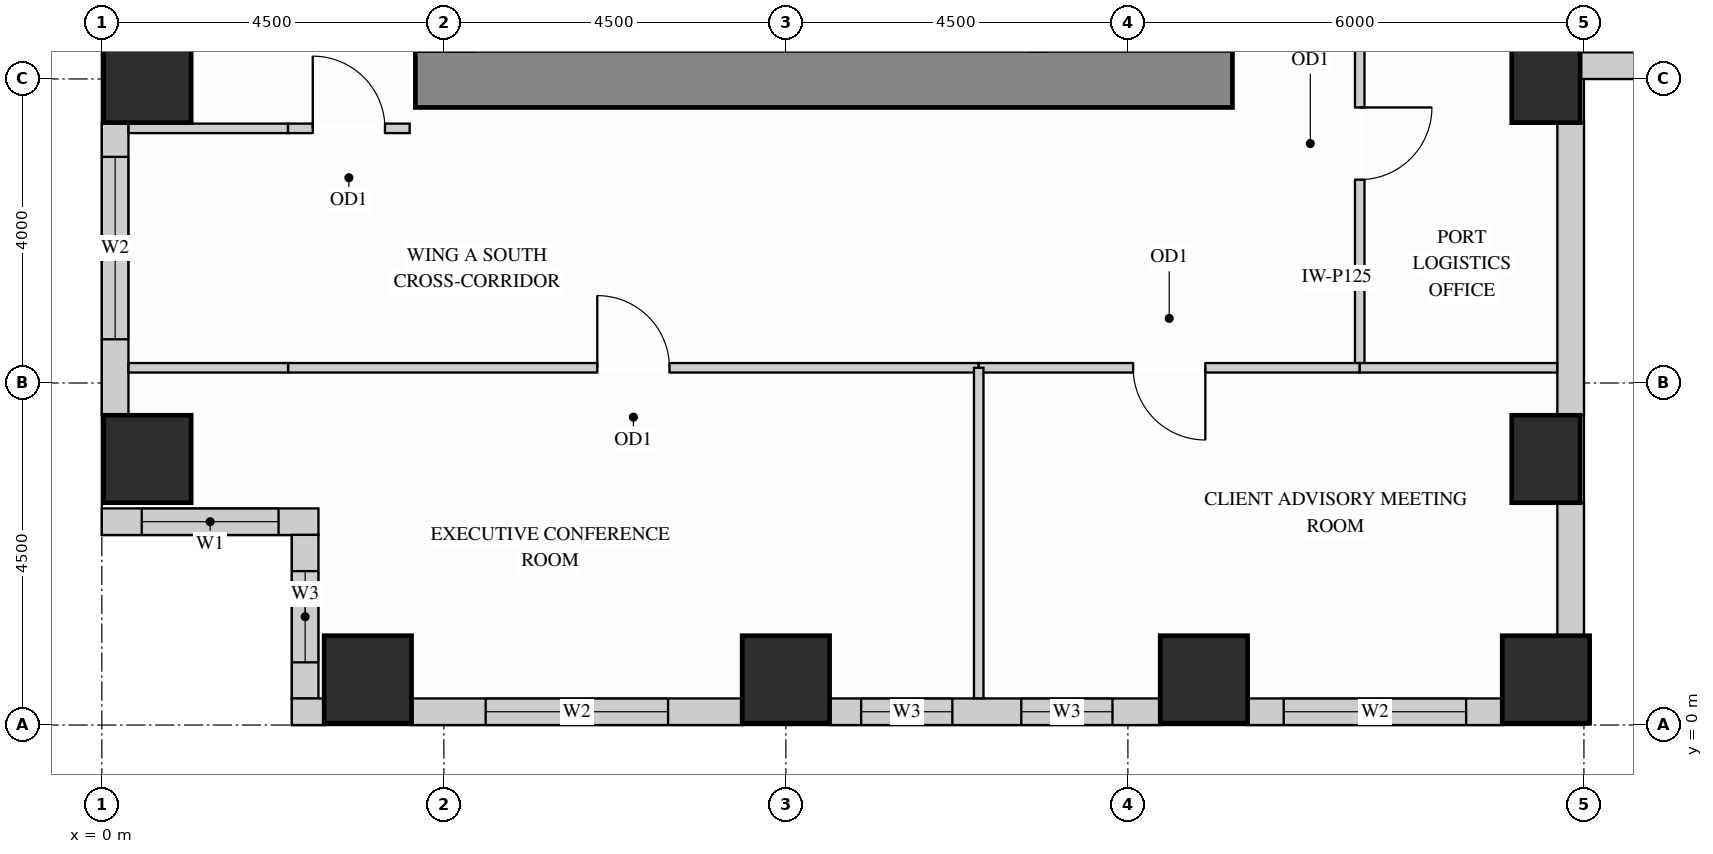
"""IFC4 building model, lengths in metres.
Left out: names, types, materials, properties, quantities, classifications, styles, units other than length and angle.
Written with IfcOpenShell. Run it as: python <this file> out.ifc"""

import sys

from ifc_helpers import new_model, si_unit, direction, frame, frame_2d, origin, origin_2d, place, context, subcontext, project, spatial, rectangle, extrude, source, transform, mapped, element, fill, save


model = new_model("IFC4")
c1 = context("Model", 3, precision=1e-05, world=origin(), true_north=direction((0.0, 1.0)))
c2 = subcontext(c1, "Body", "Model", "MODEL_VIEW")
j1 = project(units=[si_unit("LENGTHUNIT", "METRE"), si_unit("PLANEANGLEUNIT", "RADIAN")], contexts=[c1])
p1 = place(None, origin())
s1 = spatial("IfcSite", under=j1, at=p1, CompositionType="ELEMENT")
p2 = place(p1, origin())
s2 = spatial("IfcBuilding", under=s1, at=p2, CompositionType="ELEMENT")
p3 = place(p2, frame((0.0, 0.0, 99.0)))
s3 = spatial("IfcBuildingStorey", under=s2, at=p3, CompositionType="ELEMENT", Elevation=99.0)
m1 = source(origin(), c2, "Body", "SweptSolid", [
    extrude(rectangle(XDim=0.9, YDim=1.15, at=origin_2d()), origin(), (0.0, 0.0, 1.0), 3.38),
])
for number, where, z_axis, x_axis in (
    (1, (19.0, 3.5, 0.0), (0.0, 0.0, 1.0), (1.0, 0.0, 0.0)),
    (2, (19.0, 8.5, 0.0), (0.0, 0.0, 1.0), (1.0, 0.0, 0.0)),
):
    element("IfcColumn", number, at=place(p3, frame(where, z_axis=z_axis, x_axis=x_axis)), inside=s3, PredefinedType="COLUMN", context=c2, shape_type="MappedRepresentation", body=[
        mapped(m1, transform((0.0, 0.0, 0.0), x_axis=(1.0, 0.0, 0.0), y_axis=(0.0, 1.0, 0.0), z_axis=(0.0, 0.0, 1.0))),
    ])
m2 = source(origin(), c2, "Body", "SweptSolid", [
    extrude(rectangle(XDim=1.15, YDim=1.15, at=origin_2d()), origin(), (0.0, 0.0, 1.0), 3.38),
])
for number, where, z_axis, x_axis in (
    (3, (14.5, 0.6, 0.0), (0.0, 0.0, 1.0), (1.0, 0.0, 0.0)),
    (4, (19.0, 0.6, 0.0), (0.0, 0.0, 1.0), (1.0, 0.0, 0.0)),
    (5, (3.5, 0.6, 0.0), (0.0, 0.0, 1.0), (1.0, 0.0, 0.0)),
    (6, (9.0, 0.6, 0.0), (0.0, 0.0, 1.0), (1.0, 0.0, 0.0)),
    (7, (0.6, 3.5, 0.0), (0.0, 0.0, 1.0), (1.0, 0.0, 0.0)),
    (8, (0.6, 8.5, 0.0), (0.0, 0.0, 1.0), (1.0, 0.0, 0.0)),
):
    element("IfcColumn", number, at=place(p3, frame(where, z_axis=z_axis, x_axis=x_axis)), inside=s3, PredefinedType="COLUMN", context=c2, shape_type="MappedRepresentation", body=[
        mapped(m2, transform((0.0, 0.0, 0.0), x_axis=(1.0, 0.0, 0.0), y_axis=(0.0, 1.0, 0.0), z_axis=(0.0, 0.0, 1.0))),
    ])
m3 = source(origin(), c2, "Body", "SweptSolid", [
    extrude(rectangle(XDim=10.75, YDim=0.75, at=frame_2d((5.375, 0.0))), origin(), (0.0, 0.0, 1.0), 3.38),
])
p4 = place(p3, frame((4.125, 8.5, 0.0), z_axis=(0.0, 0.0, 1.0), x_axis=(1.0, 0.0, 0.0)))
e9 = element("IfcWall", 9, at=p4, inside=s3, PredefinedType="SHEAR", context=c2, shape_type="MappedRepresentation", body=[
    mapped(m3, transform((0.0, 0.0, 0.0), x_axis=(1.0, 0.0, 0.0), y_axis=(0.0, 1.0, 0.0), z_axis=(0.0, 0.0, 1.0))),
])
p5 = place(p3, frame((0.175, 7.927, 0.0), z_axis=(0.0, 0.0, 1.0), x_axis=(0.0, -1.0, 0.0)))
e10 = element("IfcWall", 10, at=p5, inside=s3, PredefinedType="SOLIDWALL", context=c2, shape_type="SweptSolid", body=[
    extrude(rectangle(XDim=3.854, YDim=0.35, at=frame_2d((1.927, 0.0))), origin(), (0.0, 0.0, 1.0), 3.365),
])
p6 = place(p5, frame((0.452, 0.0, 0.78)))
e11 = element("IfcOpeningElement", 11, at=p6, cuts=e10, PredefinedType="OPENING", context=c2, shape_type="SweptSolid", body=[
    extrude(rectangle(XDim=2.4, YDim=2.1, at=frame_2d((1.2, 1.05))), frame((0.0, 0.185, 0.0), z_axis=(0.0, -1.0, 0.0), x_axis=(1.0, 0.0, 0.0)), (0.0, 0.0, 1.0), 0.37),
])
p7 = place(p3, frame((0.0, 2.675, 0.0), z_axis=(0.0, 0.0, 1.0), x_axis=(1.0, 0.0, 0.0)))
e12 = element("IfcWall", 12, at=p7, inside=s3, PredefinedType="SOLIDWALL", context=c2, shape_type="SweptSolid", body=[
    extrude(rectangle(XDim=2.85, YDim=0.35, at=frame_2d((1.425, 0.0))), origin(), (0.0, 0.0, 1.0), 3.365),
])
p8 = place(p7, frame((0.525, 0.0, 0.78)))
e13 = element("IfcOpeningElement", 13, at=p8, cuts=e12, PredefinedType="OPENING", context=c2, shape_type="SweptSolid", body=[
    extrude(rectangle(XDim=1.8, YDim=2.1, at=frame_2d((0.9, 1.05))), frame((0.0, 0.185, 0.0), z_axis=(0.0, -1.0, 0.0), x_axis=(1.0, 0.0, 0.0)), (0.0, 0.0, 1.0), 0.37),
])
p9 = place(p3, frame((2.675, 2.502, 0.0), z_axis=(0.0, 0.0, 1.0), x_axis=(0.0, -1.0, 0.0)))
e14 = element("IfcWall", 14, at=p9, inside=s3, PredefinedType="SOLIDWALL", context=c2, shape_type="SweptSolid", body=[
    extrude(rectangle(XDim=2.154, YDim=0.35, at=frame_2d((1.077, 0.0))), origin(), (0.0, 0.0, 1.0), 3.365),
])
p10 = place(p9, frame((0.477, 0.0, 0.78)))
e15 = element("IfcOpeningElement", 15, at=p10, cuts=e14, PredefinedType="OPENING", context=c2, shape_type="SweptSolid", body=[
    extrude(rectangle(XDim=1.2, YDim=2.1, at=frame_2d((0.6, 1.05))), frame((0.0, 0.185, 0.0), z_axis=(0.0, -1.0, 0.0), x_axis=(1.0, 0.0, 0.0)), (0.0, 0.0, 1.0), 0.37),
])
m4 = source(origin(), c2, "Body", "SweptSolid", [
    extrude(rectangle(XDim=0.427, YDim=0.35, at=frame_2d((0.213, 0.0))), origin(), (0.0, 0.0, 1.0), 3.365),
])
p11 = place(p3, frame((2.5, 0.175, 0.0), z_axis=(0.0, 0.0, 1.0), x_axis=(1.0, 0.0, 0.0)))
e16 = element("IfcWall", 16, at=p11, inside=s3, PredefinedType="SOLIDWALL", context=c2, shape_type="MappedRepresentation", body=[
    mapped(m4, transform((0.0, 0.0, 0.0), x_axis=(1.0, 0.0, 0.0), y_axis=(0.0, 1.0, 0.0), z_axis=(0.0, 0.0, 1.0))),
])
p12 = place(p3, frame((4.073, 0.175, 0.0), z_axis=(0.0, 0.0, 1.0), x_axis=(1.0, 0.0, 0.0)))
e17 = element("IfcWall", 17, at=p12, inside=s3, PredefinedType="SOLIDWALL", context=c2, shape_type="SweptSolid", body=[
    extrude(rectangle(XDim=4.354, YDim=0.35, at=frame_2d((2.177, 0.0))), origin(), (0.0, 0.0, 1.0), 3.365),
])
p13 = place(p12, frame((0.977, 0.0, 0.78)))
e18 = element("IfcOpeningElement", 18, at=p13, cuts=e17, PredefinedType="OPENING", context=c2, shape_type="SweptSolid", body=[
    extrude(rectangle(XDim=2.4, YDim=2.1, at=frame_2d((1.2, 1.05))), frame((0.0, 0.185, 0.0), z_axis=(0.0, -1.0, 0.0), x_axis=(1.0, 0.0, 0.0)), (0.0, 0.0, 1.0), 0.37),
])
p14 = place(p3, frame((9.573, 0.175, 0.0), z_axis=(0.0, 0.0, 1.0), x_axis=(1.0, 0.0, 0.0)))
e19 = element("IfcWall", 19, at=p14, inside=s3, PredefinedType="SOLIDWALL", context=c2, shape_type="SweptSolid", body=[
    extrude(rectangle(XDim=4.354, YDim=0.35, at=frame_2d((2.177, 0.0))), origin(), (0.0, 0.0, 1.0), 3.365),
])
p15 = place(p14, frame((0.417, 0.0, 0.78)))
e20 = element("IfcOpeningElement", 20, at=p15, cuts=e19, PredefinedType="OPENING", context=c2, shape_type="SweptSolid", body=[
    extrude(rectangle(XDim=1.2, YDim=2.1, at=frame_2d((0.6, 1.05))), frame((0.0, 0.185, 0.0), z_axis=(0.0, -1.0, 0.0), x_axis=(1.0, 0.0, 0.0)), (0.0, 0.0, 1.0), 0.37),
])
p16 = place(p14, frame((2.524, 0.0, 0.78)))
e21 = element("IfcOpeningElement", 21, at=p16, cuts=e19, PredefinedType="OPENING", context=c2, shape_type="SweptSolid", body=[
    extrude(rectangle(XDim=1.2, YDim=2.1, at=frame_2d((0.6, 1.05))), frame((0.0, 0.185, 0.0), z_axis=(0.0, -1.0, 0.0), x_axis=(1.0, 0.0, 0.0)), (0.0, 0.0, 1.0), 0.37),
])
p17 = place(p3, frame((15.073, 0.175, 0.0), z_axis=(0.0, 0.0, 1.0), x_axis=(1.0, 0.0, 0.0)))
e22 = element("IfcWall", 22, at=p17, inside=s3, PredefinedType="SOLIDWALL", context=c2, shape_type="SweptSolid", body=[
    extrude(rectangle(XDim=3.354, YDim=0.35, at=frame_2d((1.677, 0.0))), origin(), (0.0, 0.0, 1.0), 3.365),
])
p18 = place(p17, frame((0.477, 0.0, 0.78)))
e23 = element("IfcOpeningElement", 23, at=p18, cuts=e22, PredefinedType="OPENING", context=c2, shape_type="SweptSolid", body=[
    extrude(rectangle(XDim=2.4, YDim=2.1, at=frame_2d((1.2, 1.05))), frame((0.0, 0.185, 0.0), z_axis=(0.0, -1.0, 0.0), x_axis=(1.0, 0.0, 0.0)), (0.0, 0.0, 1.0), 0.37),
])
m5 = source(origin(), c2, "Body", "SweptSolid", [
    extrude(rectangle(XDim=1.754, YDim=0.35, at=frame_2d((0.877, 0.0))), origin(), (0.0, 0.0, 1.0), 2.519),
])
p19 = place(p3, frame((19.325, 1.173, 0.0), z_axis=(0.0, 0.0, 1.0), x_axis=(0.0, 1.0, 0.0)))
e24 = element("IfcWall", 24, at=p19, inside=s3, PredefinedType="SOLIDWALL", context=c2, shape_type="MappedRepresentation", body=[
    mapped(m5, transform((0.0, 0.0, 0.0), x_axis=(1.0, 0.0, 0.0), y_axis=(0.0, 1.0, 0.0), z_axis=(0.0, 0.0, 1.0))),
])
m6 = source(origin(), c2, "Body", "SweptSolid", [
    extrude(rectangle(XDim=3.854, YDim=0.35, at=frame_2d((1.927, 0.0))), origin(), (0.0, 0.0, 1.0), 2.519),
])
p20 = place(p3, frame((19.325, 4.073, 0.0), z_axis=(0.0, 0.0, 1.0), x_axis=(0.0, 1.0, 0.0)))
e25 = element("IfcWall", 25, at=p20, inside=s3, PredefinedType="SOLIDWALL", context=c2, shape_type="MappedRepresentation", body=[
    mapped(m6, transform((0.0, 0.0, 0.0), x_axis=(1.0, 0.0, 0.0), y_axis=(0.0, 1.0, 0.0), z_axis=(0.0, 0.0, 1.0))),
])
p21 = place(p3, frame((19.448, 8.675, 0.0), z_axis=(0.0, 0.0, 1.0), x_axis=(1.0, 0.0, 0.0)))
e26 = element("IfcWall", 26, at=p21, inside=s3, PredefinedType="SOLIDWALL", context=c2, shape_type="SweptSolid", body=[
    extrude(rectangle(XDim=3.504, YDim=0.35, at=frame_2d((1.752, 0.0))), origin(), (0.0, 0.0, 1.0), 3.365),
])
p22 = place(p21, frame((1.002, 0.0, 0.78)))
e27 = element("IfcOpeningElement", 27, at=p22, cuts=e26, PredefinedType="OPENING", context=c2, shape_type="SweptSolid", body=[
    extrude(rectangle(XDim=1.5, YDim=2.0, at=frame_2d((0.75, 1.0))), frame((0.0, 0.185, 0.0), z_axis=(0.0, -1.0, 0.0), x_axis=(1.0, 0.0, 0.0)), (0.0, 0.0, 1.0), 0.37),
])
p23 = place(p3, frame((16.55, 4.7, 0.0), z_axis=(0.0, 0.0, 1.0), x_axis=(0.0, 1.0, 0.0)))
e28 = element("IfcWall", 28, at=p23, inside=s3, PredefinedType="PARTITIONING", context=c2, shape_type="SweptSolid", body=[
    extrude(rectangle(XDim=5.9, YDim=0.125, at=frame_2d((2.95, 0.0))), origin(), (0.0, 0.0, 1.0), 3.365),
])
p24 = place(p23, frame((2.475, 0.0, 0.0)))
e29 = element("IfcOpeningElement", 29, at=p24, cuts=e28, PredefinedType="OPENING", context=c2, shape_type="SweptSolid", body=[
    extrude(rectangle(XDim=0.95, YDim=2.15, at=frame_2d((0.475, 1.075))), frame((0.0, 0.073, 0.0), z_axis=(0.0, -1.0, 0.0), x_axis=(1.0, 0.0, 0.0)), (0.0, 0.0, 1.0), 0.145),
])
m7 = source(origin(), c2, "Body", "SweptSolid", [
    extrude(rectangle(XDim=2.098, YDim=0.125, at=frame_2d((1.049, 0.0))), origin(), (0.0, 0.0, 1.0), 3.365),
])
p25 = place(p3, frame((0.352, 7.85, 0.0), z_axis=(0.0, 0.0, 1.0), x_axis=(1.0, 0.0, 0.0)))
e30 = element("IfcWall", 30, at=p25, inside=s3, PredefinedType="PARTITIONING", context=c2, shape_type="MappedRepresentation", body=[
    mapped(m7, transform((0.0, 0.0, 0.0), x_axis=(1.0, 0.0, 0.0), y_axis=(0.0, 1.0, 0.0), z_axis=(0.0, 0.0, 1.0))),
])
p26 = place(p3, frame((2.45, 7.85, 0.0), z_axis=(0.0, 0.0, 1.0), x_axis=(1.0, 0.0, 0.0)))
e31 = element("IfcWall", 31, at=p26, inside=s3, PredefinedType="PARTITIONING", context=c2, shape_type="SweptSolid", body=[
    extrude(rectangle(XDim=1.6, YDim=0.125, at=frame_2d((0.8, 0.0))), origin(), (0.0, 0.0, 1.0), 3.365),
])
p27 = place(p26, frame((0.325, 0.0, 0.0)))
e32 = element("IfcOpeningElement", 32, at=p27, cuts=e31, PredefinedType="OPENING", context=c2, shape_type="SweptSolid", body=[
    extrude(rectangle(XDim=0.95, YDim=2.15, at=frame_2d((0.475, 1.075))), frame((0.0, 0.073, 0.0), z_axis=(0.0, -1.0, 0.0), x_axis=(1.0, 0.0, 0.0)), (0.0, 0.0, 1.0), 0.145),
])
p28 = place(p3, frame((2.45, 4.7, 0.0), z_axis=(0.0, 0.0, 1.0), x_axis=(1.0, 0.0, 0.0)))
e33 = element("IfcWall", 33, at=p28, inside=s3, PredefinedType="PARTITIONING", context=c2, shape_type="SweptSolid", body=[
    extrude(rectangle(XDim=9.087, YDim=0.125, at=frame_2d((4.543, 0.0))), origin(), (0.0, 0.0, 1.0), 2.828),
])
p29 = place(p28, frame((4.069, 0.0, 0.0)))
e34 = element("IfcOpeningElement", 34, at=p29, cuts=e33, PredefinedType="OPENING", context=c2, shape_type="SweptSolid", body=[
    extrude(rectangle(XDim=0.95, YDim=2.15, at=frame_2d((0.475, 1.075))), frame((0.0, 0.073, 0.0), z_axis=(0.0, -1.0, 0.0), x_axis=(1.0, 0.0, 0.0)), (0.0, 0.0, 1.0), 0.145),
])
p30 = place(p3, frame((11.537, 4.7, 0.0), z_axis=(0.0, 0.0, 1.0), x_axis=(1.0, 0.0, 0.0)))
e35 = element("IfcWall", 35, at=p30, inside=s3, PredefinedType="PARTITIONING", context=c2, shape_type="SweptSolid", body=[
    extrude(rectangle(XDim=5.013, YDim=0.125, at=frame_2d((2.506, 0.0))), origin(), (0.0, 0.0, 1.0), 2.828),
])
p31 = place(p30, frame((2.031, 0.0, 0.0)))
e36 = element("IfcOpeningElement", 36, at=p31, cuts=e35, PredefinedType="OPENING", context=c2, shape_type="SweptSolid", body=[
    extrude(rectangle(XDim=0.95, YDim=2.15, at=frame_2d((0.475, 1.075))), frame((0.0, 0.073, 0.0), z_axis=(0.0, -1.0, 0.0), x_axis=(1.0, 0.0, 0.0)), (0.0, 0.0, 1.0), 0.145),
])
m8 = source(origin(), c2, "Body", "SweptSolid", [
    extrude(rectangle(XDim=2.098, YDim=0.125, at=frame_2d((1.049, 0.0))), origin(), (0.0, 0.0, 1.0), 2.828),
])
p32 = place(p3, frame((0.352, 4.7, 0.0), z_axis=(0.0, 0.0, 1.0), x_axis=(1.0, 0.0, 0.0)))
e37 = element("IfcWall", 37, at=p32, inside=s3, PredefinedType="PARTITIONING", context=c2, shape_type="MappedRepresentation", body=[
    mapped(m8, transform((0.0, 0.0, 0.0), x_axis=(1.0, 0.0, 0.0), y_axis=(0.0, 1.0, 0.0), z_axis=(0.0, 0.0, 1.0))),
])
m9 = source(origin(), c2, "Body", "SweptSolid", [
    extrude(rectangle(XDim=2.598, YDim=0.125, at=frame_2d((1.299, 0.0))), origin(), (0.0, 0.0, 1.0), 2.828),
])
p33 = place(p3, frame((16.55, 4.7, 0.0), z_axis=(0.0, 0.0, 1.0), x_axis=(1.0, 0.0, 0.0)))
e38 = element("IfcWall", 38, at=p33, inside=s3, PredefinedType="PARTITIONING", context=c2, shape_type="MappedRepresentation", body=[
    mapped(m9, transform((0.0, 0.0, 0.0), x_axis=(1.0, 0.0, 0.0), y_axis=(0.0, 1.0, 0.0), z_axis=(0.0, 0.0, 1.0))),
])
m10 = source(origin(), c2, "Body", "SweptSolid", [
    extrude(rectangle(XDim=4.348, YDim=0.125, at=frame_2d((2.174, 0.0))), origin(), (0.0, 0.0, 1.0), 3.365),
])
p34 = place(p3, frame((11.537, 0.352, 0.0), z_axis=(0.0, 0.0, 1.0), x_axis=(0.0, 1.0, 0.0)))
e39 = element("IfcWall", 39, at=p34, inside=s3, PredefinedType="PARTITIONING", context=c2, shape_type="MappedRepresentation", body=[
    mapped(m10, transform((0.0, 0.0, 0.0), x_axis=(1.0, 0.0, 0.0), y_axis=(0.0, 1.0, 0.0), z_axis=(0.0, 0.0, 1.0))),
])
m11 = source(origin(), c2, "Body", "SweptSolid", [
    extrude(rectangle(XDim=0.95, YDim=2.15, at=frame_2d((0.475, 1.075))), frame((0.0, 0.025, 0.0), z_axis=(0.0, -1.0, 0.0), x_axis=(1.0, 0.0, 0.0)), (0.0, 0.0, 1.0), 0.05),
])
p35 = place(p24, origin())
e40 = element("IfcDoor", 40, at=p35, inside=s3, OperationType="SINGLE_SWING_RIGHT", PredefinedType="DOOR", context=c2, shape_type="MappedRepresentation", body=[
    mapped(m11, transform((0.0, 0.0, 0.0), x_axis=(1.0, 0.0, 0.0), y_axis=(0.0, 1.0, 0.0), z_axis=(0.0, 0.0, 1.0))),
])
fill(e29, e40)
p36 = place(p29, origin())
e41 = element("IfcDoor", 41, at=p36, inside=s3, OperationType="SINGLE_SWING_LEFT", PredefinedType="DOOR", context=c2, shape_type="MappedRepresentation", body=[
    mapped(m11, transform((0.0, 0.0, 0.0), x_axis=(1.0, 0.0, 0.0), y_axis=(0.0, 1.0, 0.0), z_axis=(0.0, 0.0, 1.0))),
])
fill(e34, e41)
p37 = place(p31, origin())
e42 = element("IfcDoor", 42, at=p37, inside=s3, OperationType="SINGLE_SWING_RIGHT", PredefinedType="DOOR", context=c2, shape_type="MappedRepresentation", body=[
    mapped(m11, transform((0.0, 0.0, 0.0), x_axis=(1.0, 0.0, 0.0), y_axis=(0.0, 1.0, 0.0), z_axis=(0.0, 0.0, 1.0))),
])
fill(e36, e42)
p38 = place(p27, origin())
e43 = element("IfcDoor", 43, at=p38, inside=s3, OperationType="SINGLE_SWING_LEFT", PredefinedType="DOOR", context=c2, shape_type="MappedRepresentation", body=[
    mapped(m11, transform((0.0, 0.0, 0.0), x_axis=(1.0, 0.0, 0.0), y_axis=(0.0, 1.0, 0.0), z_axis=(0.0, 0.0, 1.0))),
])
fill(e32, e43)
m12 = source(origin(), c2, "Body", "SweptSolid", [
    extrude(rectangle(XDim=1.8, YDim=2.1, at=frame_2d((0.9, 1.05))), frame((0.0, 0.03, 0.0), z_axis=(0.0, -1.0, 0.0), x_axis=(1.0, 0.0, 0.0)), (0.0, 0.0, 1.0), 0.06),
])
p39 = place(p8, origin())
e44 = element("IfcWindow", 44, at=p39, inside=s3, PartitioningType="SINGLE_PANEL", PredefinedType="WINDOW", context=c2, shape_type="MappedRepresentation", body=[
    mapped(m12, transform((0.0, 0.0, 0.0), x_axis=(1.0, 0.0, 0.0), y_axis=(0.0, 1.0, 0.0), z_axis=(0.0, 0.0, 1.0))),
])
fill(e13, e44)
m13 = source(origin(), c2, "Body", "SweptSolid", [
    extrude(rectangle(XDim=2.4, YDim=2.1, at=frame_2d((1.2, 1.05))), frame((0.0, 0.03, 0.0), z_axis=(0.0, -1.0, 0.0), x_axis=(1.0, 0.0, 0.0)), (0.0, 0.0, 1.0), 0.06),
])
p40 = place(p6, origin())
e45 = element("IfcWindow", 45, at=p40, inside=s3, PartitioningType="SINGLE_PANEL", PredefinedType="WINDOW", context=c2, shape_type="MappedRepresentation", body=[
    mapped(m13, transform((0.0, 0.0, 0.0), x_axis=(1.0, 0.0, 0.0), y_axis=(0.0, 1.0, 0.0), z_axis=(0.0, 0.0, 1.0))),
])
fill(e11, e45)
p41 = place(p13, origin())
e46 = element("IfcWindow", 46, at=p41, inside=s3, PartitioningType="SINGLE_PANEL", PredefinedType="WINDOW", context=c2, shape_type="MappedRepresentation", body=[
    mapped(m13, transform((0.0, 0.0, 0.0), x_axis=(1.0, 0.0, 0.0), y_axis=(0.0, 1.0, 0.0), z_axis=(0.0, 0.0, 1.0))),
])
fill(e18, e46)
p42 = place(p18, origin())
e47 = element("IfcWindow", 47, at=p42, inside=s3, PartitioningType="SINGLE_PANEL", PredefinedType="WINDOW", context=c2, shape_type="MappedRepresentation", body=[
    mapped(m13, transform((0.0, 0.0, 0.0), x_axis=(1.0, 0.0, 0.0), y_axis=(0.0, 1.0, 0.0), z_axis=(0.0, 0.0, 1.0))),
])
fill(e23, e47)
m14 = source(origin(), c2, "Body", "SweptSolid", [
    extrude(rectangle(XDim=1.2, YDim=2.1, at=frame_2d((0.6, 1.05))), frame((0.0, 0.03, 0.0), z_axis=(0.0, -1.0, 0.0), x_axis=(1.0, 0.0, 0.0)), (0.0, 0.0, 1.0), 0.06),
])
p43 = place(p10, origin())
e48 = element("IfcWindow", 48, at=p43, inside=s3, PartitioningType="SINGLE_PANEL", PredefinedType="WINDOW", context=c2, shape_type="MappedRepresentation", body=[
    mapped(m14, transform((0.0, 0.0, 0.0), x_axis=(1.0, 0.0, 0.0), y_axis=(0.0, 1.0, 0.0), z_axis=(0.0, 0.0, 1.0))),
])
fill(e15, e48)
p44 = place(p15, origin())
e49 = element("IfcWindow", 49, at=p44, inside=s3, PartitioningType="SINGLE_PANEL", PredefinedType="WINDOW", context=c2, shape_type="MappedRepresentation", body=[
    mapped(m14, transform((0.0, 0.0, 0.0), x_axis=(1.0, 0.0, 0.0), y_axis=(0.0, 1.0, 0.0), z_axis=(0.0, 0.0, 1.0))),
])
fill(e20, e49)
p45 = place(p16, origin())
e50 = element("IfcWindow", 50, at=p45, inside=s3, PartitioningType="SINGLE_PANEL", PredefinedType="WINDOW", context=c2, shape_type="MappedRepresentation", body=[
    mapped(m14, transform((0.0, 0.0, 0.0), x_axis=(1.0, 0.0, 0.0), y_axis=(0.0, 1.0, 0.0), z_axis=(0.0, 0.0, 1.0))),
])
fill(e21, e50)
save(model, sys.argv[1])
